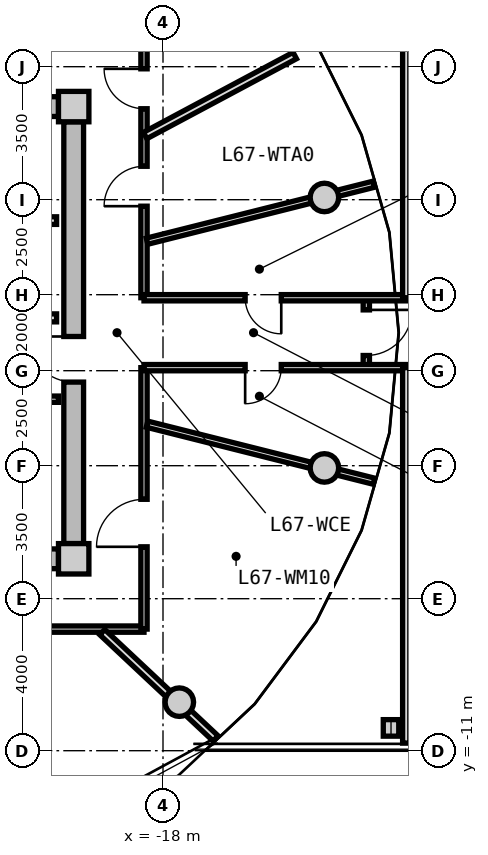
"""IFC4 building model, lengths in metres.
Left out: names, types, materials, properties, quantities, classifications, styles, units other than length and angle.
Written with IfcOpenShell. Run it as: python <this file> out.ifc"""

import sys

from ifc_helpers import new_model, si_unit, direction, frame, frame_2d, origin, origin_2d, place, context, subcontext, project, spatial, rectangle, circle, i_section, extrude, source, transform, mapped, element, fill, save


model = new_model("IFC4")
c1 = context("Model", 3, precision=1e-05, world=origin(), true_north=direction((0.0, 1.0)))
c2 = subcontext(c1, "Body", "Model", "MODEL_VIEW")
j1 = project(units=[si_unit("LENGTHUNIT", "METRE"), si_unit("PLANEANGLEUNIT", "RADIAN")], contexts=[c1])
p1 = place(None, origin())
s1 = spatial("IfcSite", under=j1, at=p1, CompositionType="ELEMENT")
p2 = place(p1, origin())
s2 = spatial("IfcBuilding", under=s1, at=p2, CompositionType="ELEMENT")
p3 = place(p2, frame((0.0, 0.0, 216.95)))
s3 = spatial("IfcBuildingStorey", under=s2, at=p3, CompositionType="ELEMENT", Elevation=216.95)
m1 = source(origin(), c2, "Body", "SweptSolid", [
    extrude(rectangle(XDim=0.8, YDim=0.8, at=origin_2d()), origin(), (0.0, 0.0, 1.0), 3.05),
])
for number, where, z_axis, x_axis in (
    (1, (-20.35, -5.95, 0.0), (0.0, 0.0, 1.0), (1.0, 0.0, 0.0)),
    (2, (-20.35, 5.95, 0.0), (0.0, 0.0, 1.0), (1.0, 0.0, 0.0)),
):
    element("IfcColumn", number, at=place(p3, frame(where, z_axis=z_axis, x_axis=x_axis)), inside=s3, PredefinedType="COLUMN", context=c2, shape_type="MappedRepresentation", body=[
        mapped(m1, transform((0.0, 0.0, 0.0), x_axis=(1.0, 0.0, 0.0), y_axis=(0.0, 1.0, 0.0), z_axis=(0.0, 0.0, 1.0), scale=1.0)),
    ])
m2 = source(origin(), c2, "Body", "SweptSolid", [
    extrude(rectangle(XDim=14.5, YDim=0.52, at=frame_2d((7.25, 0.0))), origin(), (0.0, 0.0, 1.0), 2.76),
])
for number, where, z_axis, x_axis in (
    (3, (-35.25, 5.95, 0.0), (0.0, 0.0, 1.0), (1.0, 0.0, 0.0)),
    (4, (-20.75, -5.95, 0.0), (0.0, 0.0, 1.0), (-1.0, 0.0, 0.0)),
):
    element("IfcWall", number, at=place(p3, frame(where, z_axis=z_axis, x_axis=x_axis)), inside=s3, PredefinedType="SHEAR", context=c2, shape_type="MappedRepresentation", body=[
        mapped(m2, transform((0.0, 0.0, 0.0), x_axis=(1.0, 0.0, 0.0), y_axis=(0.0, 1.0, 0.0), z_axis=(0.0, 0.0, 1.0), scale=1.0)),
    ])
m3 = source(origin(), c2, "Body", "SweptSolid", [
    extrude(rectangle(XDim=11.1, YDim=0.52, at=frame_2d((5.55, 0.0))), origin(), (0.0, 0.0, 1.0), 2.76),
])
p4 = place(p3, frame((-20.35, 5.55, 0.0), z_axis=(0.0, 0.0, 1.0), x_axis=(0.0, -1.0, 0.0)))
e5 = element("IfcWall", 5, at=p4, inside=s3, PredefinedType="SHEAR", context=c2, shape_type="MappedRepresentation", body=[
    mapped(m3, transform((0.0, 0.0, 0.0), x_axis=(1.0, 0.0, 0.0), y_axis=(0.0, 1.0, 0.0), z_axis=(0.0, 0.0, 1.0), scale=1.0)),
])
p5 = place(p4, frame((5.65, 0.0, 0.0)))
e6 = element("IfcOpeningElement", 6, at=p5, cuts=e5, PredefinedType="OPENING", context=c2, shape_type="SweptSolid", body=[
    extrude(rectangle(XDim=1.2, YDim=2.15, at=frame_2d((0.6, 1.075))), frame((0.0, 0.27, 0.0), z_axis=(0.0, -1.0, 0.0), x_axis=(1.0, 0.0, 0.0)), (0.0, 0.0, 1.0), 0.54),
])
m4 = source(origin(), c2, "Body", "SweptSolid", [
    extrude(circle(Radius=0.375, at=origin_2d()), origin(), (0.0, 0.0, 1.0), 3.05),
])
for number, where, z_axis, x_axis in (
    (7, (-13.753, 3.559, 0.0), (0.0, 0.0, 1.0), (1.0, 0.0, 0.0)),
    (8, (-17.57, -9.723, 0.0), (0.0, 0.0, 1.0), (1.0, 0.0, 0.0)),
    (9, (-13.753, -3.559, 0.0), (0.0, 0.0, 1.0), (1.0, 0.0, 0.0)),
):
    element("IfcColumn", number, at=place(p3, frame(where, z_axis=z_axis, x_axis=x_axis)), inside=s3, PredefinedType="COLUMN", context=c2, shape_type="MappedRepresentation", body=[
        mapped(m4, transform((0.0, 0.0, 0.0), x_axis=(1.0, 0.0, 0.0), y_axis=(0.0, 1.0, 0.0), z_axis=(0.0, 0.0, 1.0), scale=1.0)),
    ])
m5 = source(origin(), c2, "Body", "SweptSolid", [
    extrude(i_section(OverallWidth=0.407, OverallDepth=0.435, WebThickness=0.024, FlangeThickness=0.039, FilletRadius=0.015, at=origin_2d()), origin(), (0.0, 0.0, 1.0), 3.05),
])
p6 = place(p3, frame((-12.0, -10.4, 0.0), z_axis=(0.0, 0.0, 1.0), x_axis=(1.0, 0.0, 0.0)))
e10 = element("IfcColumn", 10, at=p6, inside=s3, PredefinedType="COLUMN", context=c2, shape_type="MappedRepresentation", body=[
    mapped(m5, transform((0.0, 0.0, 0.0), x_axis=(1.0, 0.0, 0.0), y_axis=(0.0, 1.0, 0.0), z_axis=(0.0, 0.0, 1.0), scale=1.0)),
])
m6 = source(origin(), c2, "Body", "SweptSolid", [
    extrude(rectangle(XDim=3.2, YDim=0.2, at=frame_2d((1.6, 0.0))), origin(), (0.0, 0.0, 1.0), 2.745),
])
p7 = place(p3, frame((-24.0, 2.95, 0.0), z_axis=(0.0, 0.0, 1.0), x_axis=(1.0, 0.0, 0.0)))
e11 = element("IfcWall", 11, at=p7, inside=s3, PredefinedType="PARTITIONING", context=c2, shape_type="MappedRepresentation", body=[
    mapped(m6, transform((0.0, 0.0, 0.0), x_axis=(1.0, 0.0, 0.0), y_axis=(0.0, 1.0, 0.0), z_axis=(0.0, 0.0, 1.0), scale=1.0)),
])
m7 = source(origin(), c2, "Body", "SweptSolid", [
    extrude(rectangle(XDim=6.66, YDim=0.21, at=frame_2d((3.33, 0.0))), origin(), (0.0, 0.0, 1.0), 2.745),
])
p8 = place(p3, frame((-27.46, 0.39, 0.0), z_axis=(0.0, 0.0, 1.0), x_axis=(1.0, 0.0, 0.0)))
e12 = element("IfcWall", 12, at=p8, inside=s3, PredefinedType="PARTITIONING", context=c2, shape_type="MappedRepresentation", body=[
    mapped(m7, transform((0.0, 0.0, 0.0), x_axis=(1.0, 0.0, 0.0), y_axis=(0.0, 1.0, 0.0), z_axis=(0.0, 0.0, 1.0), scale=1.0)),
])
p9 = place(p8, frame((1.0, 0.0, 0.0)))
e13 = element("IfcOpeningElement", 13, at=p9, cuts=e12, PredefinedType="OPENING", context=c2, shape_type="SweptSolid", body=[
    extrude(rectangle(XDim=1.2, YDim=2.15, at=frame_2d((0.6, 1.075))), frame((0.0, 0.115, 0.0), z_axis=(0.0, -1.0, 0.0), x_axis=(1.0, 0.0, 0.0)), (0.0, 0.0, 1.0), 0.23),
])
m8 = source(origin(), c2, "Body", "SweptSolid", [
    extrude(rectangle(XDim=2.7, YDim=0.165, at=frame_2d((1.35, 0.0))), origin(), (0.0, 0.0, 1.0), 2.745),
])
p10 = place(p3, frame((-23.45, -1.75, 0.0), z_axis=(0.0, 0.0, 1.0), x_axis=(1.0, 0.0, 0.0)))
e14 = element("IfcWall", 14, at=p10, inside=s3, PredefinedType="PARTITIONING", context=c2, shape_type="MappedRepresentation", body=[
    mapped(m8, transform((0.0, 0.0, 0.0), x_axis=(1.0, 0.0, 0.0), y_axis=(0.0, 1.0, 0.0), z_axis=(0.0, 0.0, 1.0), scale=1.0)),
])
p11 = place(p10, frame((0.85, 0.0, 0.0)))
e15 = element("IfcOpeningElement", 15, at=p11, cuts=e14, PredefinedType="OPENING", context=c2, shape_type="SweptSolid", body=[
    extrude(rectangle(XDim=0.925, YDim=2.1, at=frame_2d((0.462, 1.05))), frame((0.0, 0.093, 0.0), z_axis=(0.0, -1.0, 0.0), x_axis=(1.0, 0.0, 0.0)), (0.0, 0.0, 1.0), 0.185),
])
m9 = source(origin(), c2, "Body", "SweptSolid", [
    extrude(rectangle(XDim=19.0, YDim=0.165, at=frame_2d((9.5, 0.0))), origin(), (0.0, 0.0, 1.0), 2.745),
])
p12 = place(p3, frame((-18.5, -7.8, 0.0), z_axis=(0.0, 0.0, 1.0), x_axis=(-1.0, 0.0, 0.0)))
e16 = element("IfcWall", 16, at=p12, inside=s3, PredefinedType="PARTITIONING", context=c2, shape_type="MappedRepresentation", body=[
    mapped(m9, transform((0.0, 0.0, 0.0), x_axis=(1.0, 0.0, 0.0), y_axis=(0.0, 1.0, 0.0), z_axis=(0.0, 0.0, 1.0), scale=1.0)),
])
p13 = place(p12, frame((14.191, 0.0, 0.0)))
e17 = element("IfcOpeningElement", 17, at=p13, cuts=e16, PredefinedType="OPENING", context=c2, shape_type="SweptSolid", body=[
    extrude(rectangle(XDim=1.25, YDim=2.2, at=frame_2d((0.625, 1.1))), frame((0.0, 0.093, 0.0), z_axis=(0.0, -1.0, 0.0), x_axis=(1.0, 0.0, 0.0)), (0.0, 0.0, 1.0), 0.185),
])
p14 = place(p12, frame((8.875, 0.0, 0.0)))
e18 = element("IfcOpeningElement", 18, at=p14, cuts=e16, PredefinedType="OPENING", context=c2, shape_type="SweptSolid", body=[
    extrude(rectangle(XDim=1.25, YDim=2.2, at=frame_2d((0.625, 1.1))), frame((0.0, 0.093, 0.0), z_axis=(0.0, -1.0, 0.0), x_axis=(1.0, 0.0, 0.0)), (0.0, 0.0, 1.0), 0.185),
])
p15 = place(p12, frame((3.559, 0.0, 0.0)))
e19 = element("IfcOpeningElement", 19, at=p15, cuts=e16, PredefinedType="OPENING", context=c2, shape_type="SweptSolid", body=[
    extrude(rectangle(XDim=1.25, YDim=2.2, at=frame_2d((0.625, 1.1))), frame((0.0, 0.093, 0.0), z_axis=(0.0, -1.0, 0.0), x_axis=(1.0, 0.0, 0.0)), (0.0, 0.0, 1.0), 0.185),
])
m10 = source(origin(), c2, "Body", "SweptSolid", [
    extrude(rectangle(XDim=6.88, YDim=0.165, at=frame_2d((3.44, 0.0))), origin(), (0.0, 0.0, 1.0), 2.745),
])
p16 = place(p3, frame((-18.5, 7.8, 0.0), z_axis=(0.0, 0.0, 1.0), x_axis=(0.0, -1.0, 0.0)))
e20 = element("IfcWall", 20, at=p16, inside=s3, PredefinedType="PARTITIONING", context=c2, shape_type="MappedRepresentation", body=[
    mapped(m10, transform((0.0, 0.0, 0.0), x_axis=(1.0, 0.0, 0.0), y_axis=(0.0, 1.0, 0.0), z_axis=(0.0, 0.0, 1.0), scale=1.0)),
])
p17 = place(p16, frame((3.421, 0.0, 0.0)))
e21 = element("IfcOpeningElement", 21, at=p17, cuts=e20, PredefinedType="OPENING", context=c2, shape_type="SweptSolid", body=[
    extrude(rectangle(XDim=1.05, YDim=2.15, at=frame_2d((0.525, 1.075))), frame((0.0, 0.093, 0.0), z_axis=(0.0, -1.0, 0.0), x_axis=(1.0, 0.0, 0.0)), (0.0, 0.0, 1.0), 0.185),
])
p18 = place(p16, frame((0.856, 0.0, 0.0)))
e22 = element("IfcOpeningElement", 22, at=p18, cuts=e20, PredefinedType="OPENING", context=c2, shape_type="SweptSolid", body=[
    extrude(rectangle(XDim=1.05, YDim=2.15, at=frame_2d((0.525, 1.075))), frame((0.0, 0.093, 0.0), z_axis=(0.0, -1.0, 0.0), x_axis=(1.0, 0.0, 0.0)), (0.0, 0.0, 1.0), 0.185),
])
p19 = place(p3, frame((-18.5, -0.92, 0.0), z_axis=(0.0, 0.0, 1.0), x_axis=(0.0, -1.0, 0.0)))
e23 = element("IfcWall", 23, at=p19, inside=s3, PredefinedType="PARTITIONING", context=c2, shape_type="MappedRepresentation", body=[
    mapped(m10, transform((0.0, 0.0, 0.0), x_axis=(1.0, 0.0, 0.0), y_axis=(0.0, 1.0, 0.0), z_axis=(0.0, 0.0, 1.0), scale=1.0)),
])
p20 = place(p19, frame((3.464, 0.0, 0.0)))
e24 = element("IfcOpeningElement", 24, at=p20, cuts=e23, PredefinedType="OPENING", context=c2, shape_type="SweptSolid", body=[
    extrude(rectangle(XDim=1.25, YDim=2.2, at=frame_2d((0.625, 1.1))), frame((0.0, 0.093, 0.0), z_axis=(0.0, -1.0, 0.0), x_axis=(1.0, 0.0, 0.0)), (0.0, 0.0, 1.0), 0.185),
])
m11 = source(origin(), c2, "Body", "SweptSolid", [
    extrude(rectangle(XDim=6.157, YDim=0.165, at=frame_2d((3.079, 0.0))), origin(), (0.0, 0.0, 1.0), 2.345),
])
for number, where, z_axis, x_axis in (
    (25, (-18.42, -2.407, 0.0), (0.0, 0.0, 1.0), (0.97, -0.244, 0.0)),
    (26, (-18.42, 2.407, 0.0), (0.0, 0.0, 1.0), (0.97, 0.244, 0.0)),
):
    element("IfcWall", number, at=place(p3, frame(where, z_axis=z_axis, x_axis=x_axis)), inside=s3, PredefinedType="PARTITIONING", context=c2, shape_type="MappedRepresentation", body=[
        mapped(m11, transform((0.0, 0.0, 0.0), x_axis=(1.0, 0.0, 0.0), y_axis=(0.0, 1.0, 0.0), z_axis=(0.0, 0.0, 1.0), scale=1.0)),
    ])
m12 = source(origin(), c2, "Body", "SweptSolid", [
    extrude(rectangle(XDim=4.465, YDim=0.19, at=frame_2d((2.232, 0.0))), origin(), (0.0, 0.0, 1.0), 2.745),
])
p21 = place(p3, frame((-18.47, 5.188, 0.0), z_axis=(0.0, 0.0, 1.0), x_axis=(0.881981829834, 0.471283409259, 0.0)))
e27 = element("IfcWall", 27, at=p21, inside=s3, PredefinedType="PARTITIONING", context=c2, shape_type="MappedRepresentation", body=[
    mapped(m12, transform((0.0, 0.0, 0.0), x_axis=(1.0, 0.0, 0.0), y_axis=(0.0, 1.0, 0.0), z_axis=(0.0, 0.0, 1.0), scale=1.0)),
])
m13 = source(origin(), c2, "Body", "SweptSolid", [
    extrude(rectangle(XDim=4.089, YDim=0.19, at=frame_2d((2.044, 0.0))), origin(), (0.0, 0.0, 1.0), 2.345),
])
p22 = place(p3, frame((-19.598, -7.88, 0.0), z_axis=(0.0, 0.0, 1.0), x_axis=(0.729401273609, -0.684086092577, 0.0)))
e28 = element("IfcWall", 28, at=p22, inside=s3, PredefinedType="PARTITIONING", context=c2, shape_type="MappedRepresentation", body=[
    mapped(m13, transform((0.0, 0.0, 0.0), x_axis=(1.0, 0.0, 0.0), y_axis=(0.0, 1.0, 0.0), z_axis=(0.0, 0.0, 1.0), scale=1.0)),
])
m14 = source(origin(), c2, "Body", "SweptSolid", [
    extrude(rectangle(XDim=1.84, YDim=0.165, at=frame_2d((0.92, 0.0))), origin(), (0.0, 0.0, 1.0), 2.745),
])
p23 = place(p3, frame((-12.65, -0.92, 0.0), z_axis=(0.0, 0.0, 1.0), x_axis=(0.0, 1.0, 0.0)))
e29 = element("IfcWall", 29, at=p23, inside=s3, PredefinedType="PARTITIONING", context=c2, shape_type="MappedRepresentation", body=[
    mapped(m14, transform((0.0, 0.0, 0.0), x_axis=(1.0, 0.0, 0.0), y_axis=(0.0, 1.0, 0.0), z_axis=(0.0, 0.0, 1.0), scale=1.0)),
])
p24 = place(p23, frame((0.32, 0.0, 0.0)))
e30 = element("IfcOpeningElement", 30, at=p24, cuts=e29, PredefinedType="OPENING", context=c2, shape_type="SweptSolid", body=[
    extrude(rectangle(XDim=1.2, YDim=2.15, at=frame_2d((0.6, 1.075))), frame((0.0, 0.093, 0.0), z_axis=(0.0, -1.0, 0.0), x_axis=(1.0, 0.0, 0.0)), (0.0, 0.0, 1.0), 0.185),
])
m15 = source(origin(), c2, "Body", "SweptSolid", [
    extrude(rectangle(XDim=37.0, YDim=0.165, at=frame_2d((18.5, 0.0))), origin(), (0.0, 0.0, 1.0), 2.745),
])
p25 = place(p3, frame((-18.5, -0.92, 0.0), z_axis=(0.0, 0.0, 1.0), x_axis=(1.0, 0.0, 0.0)))
e31 = element("IfcWall", 31, at=p25, inside=s3, PredefinedType="PARTITIONING", context=c2, shape_type="MappedRepresentation", body=[
    mapped(m15, transform((0.0, 0.0, 0.0), x_axis=(1.0, 0.0, 0.0), y_axis=(0.0, 1.0, 0.0), z_axis=(0.0, 0.0, 1.0), scale=1.0)),
])
p26 = place(p25, frame((2.662, 0.0, 0.0)))
e32 = element("IfcOpeningElement", 32, at=p26, cuts=e31, PredefinedType="OPENING", context=c2, shape_type="SweptSolid", body=[
    extrude(rectangle(XDim=0.95, YDim=2.1, at=frame_2d((0.475, 1.05))), frame((0.0, 0.093, 0.0), z_axis=(0.0, -1.0, 0.0), x_axis=(1.0, 0.0, 0.0)), (0.0, 0.0, 1.0), 0.185),
])
p27 = place(p25, frame((33.388, 0.0, 0.0)))
e33 = element("IfcOpeningElement", 33, at=p27, cuts=e31, PredefinedType="OPENING", context=c2, shape_type="SweptSolid", body=[
    extrude(rectangle(XDim=0.95, YDim=2.1, at=frame_2d((0.475, 1.05))), frame((0.0, 0.093, 0.0), z_axis=(0.0, -1.0, 0.0), x_axis=(1.0, 0.0, 0.0)), (0.0, 0.0, 1.0), 0.185),
])
p28 = place(p25, frame((9.075, 0.0, 0.0)))
e34 = element("IfcOpeningElement", 34, at=p28, cuts=e31, PredefinedType="OPENING", context=c2, shape_type="SweptSolid", body=[
    extrude(rectangle(XDim=1.25, YDim=2.2, at=frame_2d((0.625, 1.1))), frame((0.0, 0.093, 0.0), z_axis=(0.0, -1.0, 0.0), x_axis=(1.0, 0.0, 0.0)), (0.0, 0.0, 1.0), 0.185),
])
p29 = place(p25, frame((14.875, 0.0, 0.0)))
e35 = element("IfcOpeningElement", 35, at=p29, cuts=e31, PredefinedType="OPENING", context=c2, shape_type="SweptSolid", body=[
    extrude(rectangle(XDim=1.25, YDim=2.2, at=frame_2d((0.625, 1.1))), frame((0.0, 0.093, 0.0), z_axis=(0.0, -1.0, 0.0), x_axis=(1.0, 0.0, 0.0)), (0.0, 0.0, 1.0), 0.185),
])
p30 = place(p25, frame((23.03, 0.0, 0.0)))
e36 = element("IfcOpeningElement", 36, at=p30, cuts=e31, PredefinedType="OPENING", context=c2, shape_type="SweptSolid", body=[
    extrude(rectangle(XDim=1.25, YDim=2.2, at=frame_2d((0.625, 1.1))), frame((0.0, 0.093, 0.0), z_axis=(0.0, -1.0, 0.0), x_axis=(1.0, 0.0, 0.0)), (0.0, 0.0, 1.0), 0.185),
])
p31 = place(p3, frame((-18.5, 0.92, 0.0), z_axis=(0.0, 0.0, 1.0), x_axis=(1.0, 0.0, 0.0)))
e37 = element("IfcWall", 37, at=p31, inside=s3, PredefinedType="PARTITIONING", context=c2, shape_type="MappedRepresentation", body=[
    mapped(m15, transform((0.0, 0.0, 0.0), x_axis=(1.0, 0.0, 0.0), y_axis=(0.0, 1.0, 0.0), z_axis=(0.0, 0.0, 1.0), scale=1.0)),
])
p32 = place(p31, frame((2.662, 0.0, 0.0)))
e38 = element("IfcOpeningElement", 38, at=p32, cuts=e37, PredefinedType="OPENING", context=c2, shape_type="SweptSolid", body=[
    extrude(rectangle(XDim=0.95, YDim=2.1, at=frame_2d((0.475, 1.05))), frame((0.0, 0.093, 0.0), z_axis=(0.0, -1.0, 0.0), x_axis=(1.0, 0.0, 0.0)), (0.0, 0.0, 1.0), 0.185),
])
p33 = place(p31, frame((33.388, 0.0, 0.0)))
e39 = element("IfcOpeningElement", 39, at=p33, cuts=e37, PredefinedType="OPENING", context=c2, shape_type="SweptSolid", body=[
    extrude(rectangle(XDim=0.95, YDim=2.1, at=frame_2d((0.475, 1.05))), frame((0.0, 0.093, 0.0), z_axis=(0.0, -1.0, 0.0), x_axis=(1.0, 0.0, 0.0)), (0.0, 0.0, 1.0), 0.185),
])
p34 = place(p31, frame((7.64, 0.0, 0.0)))
e40 = element("IfcOpeningElement", 40, at=p34, cuts=e37, PredefinedType="OPENING", context=c2, shape_type="SweptSolid", body=[
    extrude(rectangle(XDim=0.92, YDim=2.1, at=frame_2d((0.46, 1.05))), frame((0.0, 0.093, 0.0), z_axis=(0.0, -1.0, 0.0), x_axis=(1.0, 0.0, 0.0)), (0.0, 0.0, 1.0), 0.185),
])
p35 = place(p31, frame((10.275, 0.0, 0.0)))
e41 = element("IfcOpeningElement", 41, at=p35, cuts=e37, PredefinedType="OPENING", context=c2, shape_type="SweptSolid", body=[
    extrude(rectangle(XDim=1.25, YDim=2.2, at=frame_2d((0.625, 1.1))), frame((0.0, 0.093, 0.0), z_axis=(0.0, -1.0, 0.0), x_axis=(1.0, 0.0, 0.0)), (0.0, 0.0, 1.0), 0.185),
])
p36 = place(p31, frame((14.875, 0.0, 0.0)))
e42 = element("IfcOpeningElement", 42, at=p36, cuts=e37, PredefinedType="OPENING", context=c2, shape_type="SweptSolid", body=[
    extrude(rectangle(XDim=1.25, YDim=2.2, at=frame_2d((0.625, 1.1))), frame((0.0, 0.093, 0.0), z_axis=(0.0, -1.0, 0.0), x_axis=(1.0, 0.0, 0.0)), (0.0, 0.0, 1.0), 0.185),
])
p37 = place(p31, frame((23.03, 0.0, 0.0)))
e43 = element("IfcOpeningElement", 43, at=p37, cuts=e37, PredefinedType="OPENING", context=c2, shape_type="SweptSolid", body=[
    extrude(rectangle(XDim=1.25, YDim=2.2, at=frame_2d((0.625, 1.1))), frame((0.0, 0.093, 0.0), z_axis=(0.0, -1.0, 0.0), x_axis=(1.0, 0.0, 0.0)), (0.0, 0.0, 1.0), 0.185),
])
m16 = source(origin(), c2, "Body", "SweptSolid", [
    extrude(rectangle(XDim=9.88, YDim=0.19, at=frame_2d((4.94, 0.0))), origin(), (0.0, 0.0, 1.0), 2.745),
])
for number, where, z_axis, x_axis in (
    (44, (-11.6, -10.8, 0.0), (0.0, 0.0, 1.0), (0.0, 1.0, 0.0)),
    (45, (-11.6, 0.92, 0.0), (0.0, 0.0, 1.0), (0.0, 1.0, 0.0)),
):
    element("IfcWall", number, at=place(p3, frame(where, z_axis=z_axis, x_axis=x_axis)), inside=s3, PredefinedType="PARTITIONING", context=c2, shape_type="MappedRepresentation", body=[
        mapped(m16, transform((0.0, 0.0, 0.0), x_axis=(1.0, 0.0, 0.0), y_axis=(0.0, 1.0, 0.0), z_axis=(0.0, 0.0, 1.0), scale=1.0)),
    ])
m17 = source(origin(), c2, "Body", "SweptSolid", [
    extrude(rectangle(XDim=1.2, YDim=2.15, at=frame_2d((0.6, 1.075))), frame((0.0, 0.025, 0.0), z_axis=(0.0, -1.0, 0.0), x_axis=(1.0, 0.0, 0.0)), (0.0, 0.0, 1.0), 0.05),
])
p38 = place(p5, frame((1.2, 0.0, 0.0), z_axis=(0.0, 0.0, 1.0), x_axis=(-1.0, 0.0, 0.0)))
e46 = element("IfcDoor", 46, at=p38, inside=s3, OperationType="SINGLE_SWING_RIGHT", PredefinedType="DOOR", context=c2, shape_type="MappedRepresentation", body=[
    mapped(m17, transform((0.0, 0.0, 0.0), x_axis=(1.0, 0.0, 0.0), y_axis=(0.0, 1.0, 0.0), z_axis=(0.0, 0.0, 1.0), scale=1.0)),
])
fill(e6, e46)
m18 = source(origin(), c2, "Body", "SweptSolid", [
    extrude(rectangle(XDim=0.95, YDim=2.1, at=frame_2d((0.475, 1.05))), frame((0.0, 0.025, 0.0), z_axis=(0.0, -1.0, 0.0), x_axis=(1.0, 0.0, 0.0)), (0.0, 0.0, 1.0), 0.05),
])
p39 = place(p26, frame((0.95, 0.0, 0.0), z_axis=(0.0, 0.0, 1.0), x_axis=(-1.0, 0.0, 0.0)))
e47 = element("IfcDoor", 47, at=p39, inside=s3, OperationType="SINGLE_SWING_RIGHT", PredefinedType="DOOR", context=c2, shape_type="MappedRepresentation", body=[
    mapped(m18, transform((0.0, 0.0, 0.0), x_axis=(1.0, 0.0, 0.0), y_axis=(0.0, 1.0, 0.0), z_axis=(0.0, 0.0, 1.0), scale=1.0)),
])
fill(e32, e47)
p40 = place(p32, frame((0.95, 0.0, 0.0), z_axis=(0.0, 0.0, 1.0), x_axis=(-1.0, 0.0, 0.0)))
e48 = element("IfcDoor", 48, at=p40, inside=s3, OperationType="SINGLE_SWING_LEFT", PredefinedType="DOOR", context=c2, shape_type="MappedRepresentation", body=[
    mapped(m18, transform((0.0, 0.0, 0.0), x_axis=(1.0, 0.0, 0.0), y_axis=(0.0, 1.0, 0.0), z_axis=(0.0, 0.0, 1.0), scale=1.0)),
])
fill(e38, e48)
m19 = source(origin(), c2, "Body", "SweptSolid", [
    extrude(rectangle(XDim=1.05, YDim=2.15, at=frame_2d((0.525, 1.075))), frame((0.0, 0.025, 0.0), z_axis=(0.0, -1.0, 0.0), x_axis=(1.0, 0.0, 0.0)), (0.0, 0.0, 1.0), 0.05),
])
p41 = place(p17, frame((1.05, 0.0, 0.0), z_axis=(0.0, 0.0, 1.0), x_axis=(-1.0, 0.0, 0.0)))
e49 = element("IfcDoor", 49, at=p41, inside=s3, OperationType="SINGLE_SWING_LEFT", PredefinedType="DOOR", context=c2, shape_type="MappedRepresentation", body=[
    mapped(m19, transform((0.0, 0.0, 0.0), x_axis=(1.0, 0.0, 0.0), y_axis=(0.0, 1.0, 0.0), z_axis=(0.0, 0.0, 1.0), scale=1.0)),
])
fill(e21, e49)
p42 = place(p18, frame((1.05, 0.0, 0.0), z_axis=(0.0, 0.0, 1.0), x_axis=(-1.0, 0.0, 0.0)))
e50 = element("IfcDoor", 50, at=p42, inside=s3, OperationType="SINGLE_SWING_RIGHT", PredefinedType="DOOR", context=c2, shape_type="MappedRepresentation", body=[
    mapped(m19, transform((0.0, 0.0, 0.0), x_axis=(1.0, 0.0, 0.0), y_axis=(0.0, 1.0, 0.0), z_axis=(0.0, 0.0, 1.0), scale=1.0)),
])
fill(e22, e50)
m20 = source(origin(), c2, "Body", "SweptSolid", [
    extrude(rectangle(XDim=1.25, YDim=2.2, at=frame_2d((0.625, 1.1))), frame((0.0, 0.025, 0.0), z_axis=(0.0, -1.0, 0.0), x_axis=(1.0, 0.0, 0.0)), (0.0, 0.0, 1.0), 0.05),
])
p43 = place(p20, frame((1.25, 0.0, 0.0), z_axis=(0.0, 0.0, 1.0), x_axis=(-1.0, 0.0, 0.0)))
e51 = element("IfcDoor", 51, at=p43, inside=s3, OperationType="SINGLE_SWING_LEFT", PredefinedType="DOOR", context=c2, shape_type="MappedRepresentation", body=[
    mapped(m20, transform((0.0, 0.0, 0.0), x_axis=(1.0, 0.0, 0.0), y_axis=(0.0, 1.0, 0.0), z_axis=(0.0, 0.0, 1.0), scale=1.0)),
])
fill(e24, e51)
p44 = place(p24, frame((1.2, 0.0, 0.0), z_axis=(0.0, 0.0, 1.0), x_axis=(-1.0, 0.0, 0.0)))
e52 = element("IfcDoor", 52, at=p44, inside=s3, OperationType="SINGLE_SWING_LEFT", PredefinedType="DOOR", context=c2, shape_type="MappedRepresentation", body=[
    mapped(m17, transform((0.0, 0.0, 0.0), x_axis=(1.0, 0.0, 0.0), y_axis=(0.0, 1.0, 0.0), z_axis=(0.0, 0.0, 1.0), scale=1.0)),
])
fill(e30, e52)
save(model, sys.argv[1])
